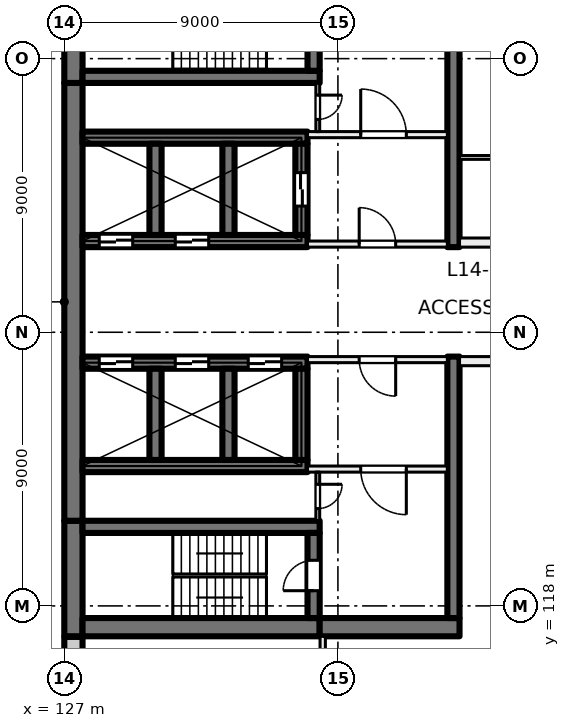
"""IFC4 building model, lengths in metres.
Left out: names, types, materials, properties, quantities, classifications, styles, units other than length and angle.
Written with IfcOpenShell. Run it as: python <this file> out.ifc"""

import sys

from ifc_helpers import new_model, si_unit, direction, frame, frame_2d, origin, place, context, subcontext, project, spatial, rectangle, extrude, element, fill, save


model = new_model("IFC4")
c1 = context("Model", 3, precision=1e-05, world=origin(), true_north=direction((0.0, 1.0)))
c2 = subcontext(c1, "Body", "Model", "MODEL_VIEW")
j1 = project(units=[si_unit("LENGTHUNIT", "METRE"), si_unit("PLANEANGLEUNIT", "RADIAN")], contexts=[c1])
p1 = place(None, origin())
s1 = spatial("IfcSite", under=j1, at=p1, CompositionType="ELEMENT")
p2 = place(p1, origin())
s2 = spatial("IfcBuilding", under=s1, at=p2, CompositionType="ELEMENT")
p3 = place(p2, frame((0.0, 0.0, 63.5)))
s3 = spatial("IfcBuildingStorey", under=s2, at=p3, CompositionType="ELEMENT", Elevation=63.5)
p4 = place(p3, frame((127.3, 117.0, 0.0), z_axis=(0.0, 0.0, 1.0), x_axis=(0.0, 1.0, 0.0)))
e1 = element("IfcWall", 1, at=p4, inside=s3, PredefinedType="SHEAR", context=c2, shape_type="SweptSolid", body=[
    extrude(rectangle(XDim=3.8, YDim=0.6, at=frame_2d((1.9, 0.0))), origin(), (0.0, 0.0, 1.0), 4.0),
])
p5 = place(p3, frame((127.3, 120.8, 0.0), z_axis=(0.0, 0.0, 1.0), x_axis=(0.0, 1.0, 0.0)))
e2 = element("IfcWall", 2, at=p5, inside=s3, PredefinedType="SHEAR", context=c2, shape_type="SweptSolid", body=[
    extrude(rectangle(XDim=14.4, YDim=0.6, at=frame_2d((7.2, 0.0))), origin(), (0.0, 0.0, 1.0), 4.0),
])
p6 = place(p3, frame((127.3, 135.2, 0.0), z_axis=(0.0, 0.0, 1.0), x_axis=(0.0, 1.0, 0.0)))
e3 = element("IfcWall", 3, at=p6, inside=s3, PredefinedType="SHEAR", context=c2, shape_type="SweptSolid", body=[
    extrude(rectangle(XDim=3.8, YDim=0.6, at=frame_2d((1.9, 0.0))), origin(), (0.0, 0.0, 1.0), 4.0),
])
p7 = place(p3, frame((127.6, 117.3, 0.0), z_axis=(0.0, 0.0, 1.0), x_axis=(1.0, 0.0, 0.0)))
e4 = element("IfcWall", 4, at=p7, inside=s3, PredefinedType="SHEAR", context=c2, shape_type="SweptSolid", body=[
    extrude(rectangle(XDim=7.8, YDim=0.6, at=frame_2d((3.9, 0.0))), origin(), (0.0, 0.0, 1.0), 4.0),
])
p8 = place(p3, frame((135.4, 117.3, 0.0), z_axis=(0.0, 0.0, 1.0), x_axis=(1.0, 0.0, 0.0)))
e5 = element("IfcWall", 5, at=p8, inside=s3, PredefinedType="SHEAR", context=c2, shape_type="SweptSolid", body=[
    extrude(rectangle(XDim=4.6, YDim=0.6, at=frame_2d((2.3, 0.0))), origin(), (0.0, 0.0, 1.0), 4.0),
])
p9 = place(p3, frame((127.6, 120.6, 0.0), z_axis=(0.0, 0.0, 1.0), x_axis=(1.0, 0.0, 0.0)))
e6 = element("IfcWall", 6, at=p9, inside=s3, PredefinedType="SHEAR", context=c2, shape_type="SweptSolid", body=[
    extrude(rectangle(XDim=7.8, YDim=0.4, at=frame_2d((3.9, 0.0))), origin(), (0.0, 0.0, 1.0), 4.0),
])
p10 = place(p3, frame((135.2, 117.6, 0.0), z_axis=(0.0, 0.0, 1.0), x_axis=(0.0, 1.0, 0.0)))
e7 = element("IfcWall", 7, at=p10, inside=s3, PredefinedType="SHEAR", context=c2, shape_type="SweptSolid", body=[
    extrude(rectangle(XDim=2.8, YDim=0.4, at=frame_2d((1.4, 0.0))), origin(), (0.0, 0.0, 1.0), 4.0),
])
p11 = place(p10, frame((0.9, 0.0, 0.0)))
e8 = element("IfcOpeningElement", 8, at=p11, cuts=e7, PredefinedType="OPENING", context=c2, shape_type="SweptSolid", body=[
    extrude(rectangle(XDim=1.0, YDim=2.1, at=frame_2d((0.5, 1.05))), frame((0.0, 0.21, 0.0), z_axis=(0.0, -1.0, 0.0), x_axis=(1.0, 0.0, 0.0)), (0.0, 0.0, 1.0), 0.42),
])
p12 = place(p3, frame((127.6, 135.4, 0.0), z_axis=(0.0, 0.0, 1.0), x_axis=(1.0, 0.0, 0.0)))
e9 = element("IfcWall", 9, at=p12, inside=s3, PredefinedType="SHEAR", context=c2, shape_type="SweptSolid", body=[
    extrude(rectangle(XDim=7.8, YDim=0.4, at=frame_2d((3.9, 0.0))), origin(), (0.0, 0.0, 1.0), 4.0),
])
p13 = place(p3, frame((135.2, 135.6, 0.0), z_axis=(0.0, 0.0, 1.0), x_axis=(0.0, 1.0, 0.0)))
e10 = element("IfcWall", 10, at=p13, inside=s3, PredefinedType="SHEAR", context=c2, shape_type="SweptSolid", body=[
    extrude(rectangle(XDim=2.8, YDim=0.4, at=frame_2d((1.4, 0.0))), origin(), (0.0, 0.0, 1.0), 4.0),
])
p14 = place(p13, frame((0.9, 0.0, 0.0)))
e11 = element("IfcOpeningElement", 11, at=p14, cuts=e10, PredefinedType="OPENING", context=c2, shape_type="SweptSolid", body=[
    extrude(rectangle(XDim=1.0, YDim=2.1, at=frame_2d((0.5, 1.05))), frame((0.0, 0.21, 0.0), z_axis=(0.0, -1.0, 0.0), x_axis=(1.0, 0.0, 0.0)), (0.0, 0.0, 1.0), 0.42),
])
p15 = place(p3, frame((127.6, 126.0, 0.0), z_axis=(0.0, 0.0, 1.0), x_axis=(1.0, 0.0, 0.0)))
e12 = element("IfcWall", 12, at=p15, inside=s3, PredefinedType="SHEAR", context=c2, shape_type="SweptSolid", body=[
    extrude(rectangle(XDim=7.4, YDim=0.4, at=frame_2d((3.7, 0.0))), origin(), (0.0, 0.0, 1.0), 4.0),
])
p16 = place(p15, frame((0.55, 0.0, 0.0)))
e13 = element("IfcOpeningElement", 13, at=p16, cuts=e12, PredefinedType="OPENING", context=c2, shape_type="SweptSolid", body=[
    extrude(rectangle(XDim=1.1, YDim=2.1, at=frame_2d((0.55, 1.05))), frame((0.0, 0.21, 0.0), z_axis=(0.0, -1.0, 0.0), x_axis=(1.0, 0.0, 0.0)), (0.0, 0.0, 1.0), 0.42),
])
p17 = place(p15, frame((3.05, 0.0, 0.0)))
e14 = element("IfcOpeningElement", 14, at=p17, cuts=e12, PredefinedType="OPENING", context=c2, shape_type="SweptSolid", body=[
    extrude(rectangle(XDim=1.1, YDim=2.1, at=frame_2d((0.55, 1.05))), frame((0.0, 0.21, 0.0), z_axis=(0.0, -1.0, 0.0), x_axis=(1.0, 0.0, 0.0)), (0.0, 0.0, 1.0), 0.42),
])
p18 = place(p15, frame((5.45, 0.0, 0.0)))
e15 = element("IfcOpeningElement", 15, at=p18, cuts=e12, PredefinedType="OPENING", context=c2, shape_type="SweptSolid", body=[
    extrude(rectangle(XDim=1.1, YDim=2.1, at=frame_2d((0.55, 1.05))), frame((0.0, 0.21, 0.0), z_axis=(0.0, -1.0, 0.0), x_axis=(1.0, 0.0, 0.0)), (0.0, 0.0, 1.0), 0.42),
])
p19 = place(p3, frame((127.6, 122.6, 0.0), z_axis=(0.0, 0.0, 1.0), x_axis=(1.0, 0.0, 0.0)))
e16 = element("IfcWall", 16, at=p19, inside=s3, PredefinedType="SHEAR", context=c2, shape_type="SweptSolid", body=[
    extrude(rectangle(XDim=7.4, YDim=0.4, at=frame_2d((3.7, 0.0))), origin(), (0.0, 0.0, 1.0), 4.0),
])
for number, where, z_axis, x_axis in (
    (17, (130.0, 122.8, 0.0), (0.0, 0.0, 1.0), (0.0, 1.0, 0.0)),
    (18, (132.4, 122.8, 0.0), (0.0, 0.0, 1.0), (0.0, 1.0, 0.0)),
    (19, (134.8, 122.8, 0.0), (0.0, 0.0, 1.0), (0.0, 1.0, 0.0)),
):
    element("IfcWall", number, at=place(p3, frame(where, z_axis=z_axis, x_axis=x_axis)), inside=s3, PredefinedType="SHEAR", context=c2, shape_type="SweptSolid", body=[
        extrude(rectangle(XDim=3.0, YDim=0.4, at=frame_2d((1.5, 0.0))), origin(), (0.0, 0.0, 1.0), 4.0),
    ])
p20 = place(p3, frame((127.6, 130.0, 0.0), z_axis=(0.0, 0.0, 1.0), x_axis=(1.0, 0.0, 0.0)))
e20 = element("IfcWall", 20, at=p20, inside=s3, PredefinedType="SHEAR", context=c2, shape_type="SweptSolid", body=[
    extrude(rectangle(XDim=7.4, YDim=0.4, at=frame_2d((3.7, 0.0))), origin(), (0.0, 0.0, 1.0), 4.0),
])
p21 = place(p20, frame((0.55, 0.0, 0.0)))
e21 = element("IfcOpeningElement", 21, at=p21, cuts=e20, PredefinedType="OPENING", context=c2, shape_type="SweptSolid", body=[
    extrude(rectangle(XDim=1.1, YDim=2.1, at=frame_2d((0.55, 1.05))), frame((0.0, 0.21, 0.0), z_axis=(0.0, -1.0, 0.0), x_axis=(1.0, 0.0, 0.0)), (0.0, 0.0, 1.0), 0.42),
])
p22 = place(p20, frame((3.05, 0.0, 0.0)))
e22 = element("IfcOpeningElement", 22, at=p22, cuts=e20, PredefinedType="OPENING", context=c2, shape_type="SweptSolid", body=[
    extrude(rectangle(XDim=1.1, YDim=2.1, at=frame_2d((0.55, 1.05))), frame((0.0, 0.21, 0.0), z_axis=(0.0, -1.0, 0.0), x_axis=(1.0, 0.0, 0.0)), (0.0, 0.0, 1.0), 0.42),
])
p23 = place(p3, frame((127.6, 133.4, 0.0), z_axis=(0.0, 0.0, 1.0), x_axis=(1.0, 0.0, 0.0)))
e23 = element("IfcWall", 23, at=p23, inside=s3, PredefinedType="SHEAR", context=c2, shape_type="SweptSolid", body=[
    extrude(rectangle(XDim=7.4, YDim=0.4, at=frame_2d((3.7, 0.0))), origin(), (0.0, 0.0, 1.0), 4.0),
])
for number, where, z_axis, x_axis in (
    (24, (130.0, 130.2, 0.0), (0.0, 0.0, 1.0), (0.0, 1.0, 0.0)),
    (25, (132.4, 130.2, 0.0), (0.0, 0.0, 1.0), (0.0, 1.0, 0.0)),
):
    element("IfcWall", number, at=place(p3, frame(where, z_axis=z_axis, x_axis=x_axis)), inside=s3, PredefinedType="SHEAR", context=c2, shape_type="SweptSolid", body=[
        extrude(rectangle(XDim=3.0, YDim=0.4, at=frame_2d((1.5, 0.0))), origin(), (0.0, 0.0, 1.0), 4.0),
    ])
p24 = place(p3, frame((134.8, 130.2, 0.0), z_axis=(0.0, 0.0, 1.0), x_axis=(0.0, 1.0, 0.0)))
e26 = element("IfcWall", 26, at=p24, inside=s3, PredefinedType="SHEAR", context=c2, shape_type="SweptSolid", body=[
    extrude(rectangle(XDim=3.0, YDim=0.4, at=frame_2d((1.5, 0.0))), origin(), (0.0, 0.0, 1.0), 4.0),
])
p25 = place(p24, frame((0.95, 0.0, 0.0)))
e27 = element("IfcOpeningElement", 27, at=p25, cuts=e26, PredefinedType="OPENING", context=c2, shape_type="SweptSolid", body=[
    extrude(rectangle(XDim=1.1, YDim=2.1, at=frame_2d((0.55, 1.05))), frame((0.0, 0.21, 0.0), z_axis=(0.0, -1.0, 0.0), x_axis=(1.0, 0.0, 0.0)), (0.0, 0.0, 1.0), 0.42),
])
for number, where, z_axis, x_axis in (
    (28, (139.8, 117.6, 0.0), (0.0, 0.0, 1.0), (0.0, 1.0, 0.0)),
    (29, (139.8, 129.8, 0.0), (0.0, 0.0, 1.0), (0.0, 1.0, 0.0)),
):
    element("IfcWall", number, at=place(p3, frame(where, z_axis=z_axis, x_axis=x_axis)), inside=s3, PredefinedType="SHEAR", context=c2, shape_type="SweptSolid", body=[
        extrude(rectangle(XDim=8.6, YDim=0.4, at=frame_2d((4.3, 0.0))), origin(), (0.0, 0.0, 1.0), 4.0),
    ])
p26 = place(p3, frame((127.3, 114.07, 0.0), z_axis=(0.0, 0.0, 1.0), x_axis=(0.0, 1.0, 0.0)))
e30 = element("IfcWall", 30, at=p26, inside=s3, PredefinedType="SOLIDWALL", context=c2, shape_type="SweptSolid", body=[
    extrude(rectangle(XDim=2.91, YDim=0.6, at=frame_2d((1.455, 0.0))), origin(), (0.0, 0.0, 1.0), 3.625),
])
p27 = place(p3, frame((135.0, 129.9, 0.0), z_axis=(0.0, 0.0, 1.0), x_axis=(1.0, 0.0, 0.0)))
e31 = element("IfcWall", 31, at=p27, inside=s3, PredefinedType="PARTITIONING", context=c2, shape_type="SweptSolid", body=[
    extrude(rectangle(XDim=4.6, YDim=0.2, at=frame_2d((2.3, 0.0))), origin(), (0.0, 0.0, 1.0), 3.625),
])
p28 = place(p27, frame((1.7, 0.0, 0.0)))
e32 = element("IfcOpeningElement", 32, at=p28, cuts=e31, PredefinedType="OPENING", context=c2, shape_type="SweptSolid", body=[
    extrude(rectangle(XDim=1.2, YDim=2.1, at=frame_2d((0.6, 1.05))), frame((0.0, 0.11, 0.0), z_axis=(0.0, -1.0, 0.0), x_axis=(1.0, 0.0, 0.0)), (0.0, 0.0, 1.0), 0.22),
])
p29 = place(p3, frame((135.0, 133.5, 0.0), z_axis=(0.0, 0.0, 1.0), x_axis=(1.0, 0.0, 0.0)))
e33 = element("IfcWall", 33, at=p29, inside=s3, PredefinedType="PARTITIONING", context=c2, shape_type="SweptSolid", body=[
    extrude(rectangle(XDim=4.6, YDim=0.2, at=frame_2d((2.3, 0.0))), origin(), (0.0, 0.0, 1.0), 3.625),
])
p30 = place(p29, frame((1.75, 0.0, 0.0)))
e34 = element("IfcOpeningElement", 34, at=p30, cuts=e33, PredefinedType="OPENING", context=c2, shape_type="SweptSolid", body=[
    extrude(rectangle(XDim=1.5, YDim=2.1, at=frame_2d((0.75, 1.05))), frame((0.0, 0.11, 0.0), z_axis=(0.0, -1.0, 0.0), x_axis=(1.0, 0.0, 0.0)), (0.0, 0.0, 1.0), 0.22),
])
p31 = place(p3, frame((135.337, 135.2, 0.0), z_axis=(0.0, 0.0, 1.0), x_axis=(0.0, -1.0, 0.0)))
e35 = element("IfcWall", 35, at=p31, inside=s3, PredefinedType="PARTITIONING", context=c2, shape_type="SweptSolid", body=[
    extrude(rectangle(XDim=1.6, YDim=0.125, at=frame_2d((0.8, 0.0))), origin(), (0.0, 0.0, 1.0), 3.625),
])
p32 = place(p31, frame((0.4, 0.0, 0.0)))
e36 = element("IfcOpeningElement", 36, at=p32, cuts=e35, PredefinedType="OPENING", context=c2, shape_type="SweptSolid", body=[
    extrude(rectangle(XDim=0.8, YDim=2.1, at=frame_2d((0.4, 1.05))), frame((0.0, 0.073, 0.0), z_axis=(0.0, -1.0, 0.0), x_axis=(1.0, 0.0, 0.0)), (0.0, 0.0, 1.0), 0.145),
])
p33 = place(p3, frame((139.6, 126.1, 0.0), z_axis=(0.0, 0.0, 1.0), x_axis=(-1.0, 0.0, 0.0)))
e37 = element("IfcWall", 37, at=p33, inside=s3, PredefinedType="PARTITIONING", context=c2, shape_type="SweptSolid", body=[
    extrude(rectangle(XDim=4.6, YDim=0.2, at=frame_2d((2.3, 0.0))), origin(), (0.0, 0.0, 1.0), 3.625),
])
p34 = place(p33, frame((1.7, 0.0, 0.0)))
e38 = element("IfcOpeningElement", 38, at=p34, cuts=e37, PredefinedType="OPENING", context=c2, shape_type="SweptSolid", body=[
    extrude(rectangle(XDim=1.2, YDim=2.1, at=frame_2d((0.6, 1.05))), frame((0.0, 0.11, 0.0), z_axis=(0.0, -1.0, 0.0), x_axis=(1.0, 0.0, 0.0)), (0.0, 0.0, 1.0), 0.22),
])
p35 = place(p3, frame((139.6, 122.5, 0.0), z_axis=(0.0, 0.0, 1.0), x_axis=(-1.0, 0.0, 0.0)))
e39 = element("IfcWall", 39, at=p35, inside=s3, PredefinedType="PARTITIONING", context=c2, shape_type="SweptSolid", body=[
    extrude(rectangle(XDim=4.6, YDim=0.2, at=frame_2d((2.3, 0.0))), origin(), (0.0, 0.0, 1.0), 3.625),
])
p36 = place(p35, frame((1.35, 0.0, 0.0)))
e40 = element("IfcOpeningElement", 40, at=p36, cuts=e39, PredefinedType="OPENING", context=c2, shape_type="SweptSolid", body=[
    extrude(rectangle(XDim=1.5, YDim=2.1, at=frame_2d((0.75, 1.05))), frame((0.0, 0.11, 0.0), z_axis=(0.0, -1.0, 0.0), x_axis=(1.0, 0.0, 0.0)), (0.0, 0.0, 1.0), 0.22),
])
p37 = place(p3, frame((135.337, 122.4, 0.0), z_axis=(0.0, 0.0, 1.0), x_axis=(0.0, -1.0, 0.0)))
e41 = element("IfcWall", 41, at=p37, inside=s3, PredefinedType="PARTITIONING", context=c2, shape_type="SweptSolid", body=[
    extrude(rectangle(XDim=1.6, YDim=0.125, at=frame_2d((0.8, 0.0))), origin(), (0.0, 0.0, 1.0), 3.625),
])
p38 = place(p37, frame((0.4, 0.0, 0.0)))
e42 = element("IfcOpeningElement", 42, at=p38, cuts=e41, PredefinedType="OPENING", context=c2, shape_type="SweptSolid", body=[
    extrude(rectangle(XDim=0.8, YDim=2.1, at=frame_2d((0.4, 1.05))), frame((0.0, 0.073, 0.0), z_axis=(0.0, -1.0, 0.0), x_axis=(1.0, 0.0, 0.0)), (0.0, 0.0, 1.0), 0.145),
])
p39 = place(p3, frame((135.5, 117.0, 0.0), z_axis=(0.0, 0.0, 1.0), x_axis=(0.0, -1.0, 0.0)))
e43 = element("IfcWall", 43, at=p39, inside=s3, PredefinedType="PARTITIONING", context=c2, shape_type="SweptSolid", body=[
    extrude(rectangle(XDim=6.4, YDim=0.175, at=frame_2d((3.2, 0.0))), origin(), (0.0, 0.0, 1.0), 3.625),
])
p40 = place(p39, frame((2.6, 0.0, 0.0)))
e44 = element("IfcOpeningElement", 44, at=p40, cuts=e43, PredefinedType="OPENING", context=c2, shape_type="SweptSolid", body=[
    extrude(rectangle(XDim=1.2, YDim=2.1, at=frame_2d((0.6, 1.05))), frame((0.0, 0.097, 0.0), z_axis=(0.0, -1.0, 0.0), x_axis=(1.0, 0.0, 0.0)), (0.0, 0.0, 1.0), 0.195),
])
p41 = place(p3, frame((140.0, 129.95, 0.0), z_axis=(0.0, 0.0, 1.0), x_axis=(1.0, 0.0, 0.0)))
e45 = element("IfcWall", 45, at=p41, inside=s3, PredefinedType="PARTITIONING", context=c2, shape_type="SweptSolid", body=[
    extrude(rectangle(XDim=14.0, YDim=0.3, at=frame_2d((7.0, 0.0))), origin(), (0.0, 0.0, 1.0), 3.625),
])
p42 = place(p41, frame((5.25, 0.0, 0.0)))
e46 = element("IfcOpeningElement", 46, at=p42, cuts=e45, PredefinedType="OPENING", context=c2, shape_type="SweptSolid", body=[
    extrude(rectangle(XDim=1.0, YDim=2.1, at=frame_2d((0.5, 1.05))), frame((0.0, 0.16, 0.0), z_axis=(0.0, -1.0, 0.0), x_axis=(1.0, 0.0, 0.0)), (0.0, 0.0, 1.0), 0.32),
])
p43 = place(p41, frame((10.6, 0.0, 0.0)))
e47 = element("IfcOpeningElement", 47, at=p43, cuts=e45, PredefinedType="OPENING", context=c2, shape_type="SweptSolid", body=[
    extrude(rectangle(XDim=1.8, YDim=2.1, at=frame_2d((0.9, 1.05))), frame((0.0, 0.16, 0.0), z_axis=(0.0, -1.0, 0.0), x_axis=(1.0, 0.0, 0.0)), (0.0, 0.0, 1.0), 0.32),
])
p44 = place(p3, frame((140.0, 132.75, 0.0), z_axis=(0.0, 0.0, 1.0), x_axis=(1.0, 0.0, 0.0)))
e48 = element("IfcWall", 48, at=p44, inside=s3, PredefinedType="PARTITIONING", context=c2, shape_type="SweptSolid", body=[
    extrude(rectangle(XDim=8.938, YDim=0.125, at=frame_2d((4.469, 0.0))), origin(), (0.0, 0.0, 1.0), 3.625),
])
p45 = place(p44, frame((6.329, 0.0, 0.0)))
e49 = element("IfcOpeningElement", 49, at=p45, cuts=e48, PredefinedType="OPENING", context=c2, shape_type="SweptSolid", body=[
    extrude(rectangle(XDim=0.8, YDim=2.1, at=frame_2d((0.4, 1.05))), frame((0.0, 0.073, 0.0), z_axis=(0.0, -1.0, 0.0), x_axis=(1.0, 0.0, 0.0)), (0.0, 0.0, 1.0), 0.145),
])
p46 = place(p44, frame((3.1, 0.0, 0.0)))
e50 = element("IfcOpeningElement", 50, at=p46, cuts=e48, PredefinedType="OPENING", context=c2, shape_type="SweptSolid", body=[
    extrude(rectangle(XDim=0.8, YDim=2.1, at=frame_2d((0.4, 1.05))), frame((0.0, 0.073, 0.0), z_axis=(0.0, -1.0, 0.0), x_axis=(1.0, 0.0, 0.0)), (0.0, 0.0, 1.0), 0.145),
])
p47 = place(p3, frame((154.0, 126.05, 0.0), z_axis=(0.0, 0.0, 1.0), x_axis=(-1.0, 0.0, 0.0)))
e51 = element("IfcWall", 51, at=p47, inside=s3, PredefinedType="PARTITIONING", context=c2, shape_type="SweptSolid", body=[
    extrude(rectangle(XDim=14.0, YDim=0.3, at=frame_2d((7.0, 0.0))), origin(), (0.0, 0.0, 1.0), 3.625),
])
p48 = place(p47, frame((6.1, 0.0, 0.0)))
e52 = element("IfcOpeningElement", 52, at=p48, cuts=e51, PredefinedType="OPENING", context=c2, shape_type="SweptSolid", body=[
    extrude(rectangle(XDim=1.8, YDim=2.1, at=frame_2d((0.9, 1.05))), frame((0.0, 0.16, 0.0), z_axis=(0.0, -1.0, 0.0), x_axis=(1.0, 0.0, 0.0)), (0.0, 0.0, 1.0), 0.32),
])
p49 = place(p21, origin())
e53 = element("IfcDoor", 53, at=p49, inside=s3, OperationType="DOUBLE_DOOR_SLIDING", PredefinedType="DOOR", context=c2, shape_type="SweptSolid", body=[
    extrude(rectangle(XDim=1.1, YDim=2.1, at=frame_2d((0.55, 1.05))), frame((0.0, 0.025, 0.0), z_axis=(0.0, -1.0, 0.0), x_axis=(1.0, 0.0, 0.0)), (0.0, 0.0, 1.0), 0.05),
])
fill(e21, e53)
p50 = place(p22, origin())
e54 = element("IfcDoor", 54, at=p50, inside=s3, OperationType="DOUBLE_DOOR_SLIDING", PredefinedType="DOOR", context=c2, shape_type="SweptSolid", body=[
    extrude(rectangle(XDim=1.1, YDim=2.1, at=frame_2d((0.55, 1.05))), frame((0.0, 0.025, 0.0), z_axis=(0.0, -1.0, 0.0), x_axis=(1.0, 0.0, 0.0)), (0.0, 0.0, 1.0), 0.05),
])
fill(e22, e54)
p51 = place(p16, origin())
e55 = element("IfcDoor", 55, at=p51, inside=s3, OperationType="DOUBLE_DOOR_SLIDING", PredefinedType="DOOR", context=c2, shape_type="SweptSolid", body=[
    extrude(rectangle(XDim=1.1, YDim=2.1, at=frame_2d((0.55, 1.05))), frame((0.0, 0.025, 0.0), z_axis=(0.0, -1.0, 0.0), x_axis=(1.0, 0.0, 0.0)), (0.0, 0.0, 1.0), 0.05),
])
fill(e13, e55)
p52 = place(p17, origin())
e56 = element("IfcDoor", 56, at=p52, inside=s3, OperationType="DOUBLE_DOOR_SLIDING", PredefinedType="DOOR", context=c2, shape_type="SweptSolid", body=[
    extrude(rectangle(XDim=1.1, YDim=2.1, at=frame_2d((0.55, 1.05))), frame((0.0, 0.025, 0.0), z_axis=(0.0, -1.0, 0.0), x_axis=(1.0, 0.0, 0.0)), (0.0, 0.0, 1.0), 0.05),
])
fill(e14, e56)
p53 = place(p18, origin())
e57 = element("IfcDoor", 57, at=p53, inside=s3, OperationType="DOUBLE_DOOR_SLIDING", PredefinedType="DOOR", context=c2, shape_type="SweptSolid", body=[
    extrude(rectangle(XDim=1.1, YDim=2.1, at=frame_2d((0.55, 1.05))), frame((0.0, 0.025, 0.0), z_axis=(0.0, -1.0, 0.0), x_axis=(1.0, 0.0, 0.0)), (0.0, 0.0, 1.0), 0.05),
])
fill(e15, e57)
p54 = place(p28, origin())
e58 = element("IfcDoor", 58, at=p54, inside=s3, OperationType="DOUBLE_DOOR_SINGLE_SWING", PredefinedType="DOOR", context=c2, shape_type="SweptSolid", body=[
    extrude(rectangle(XDim=1.2, YDim=2.1, at=frame_2d((0.6, 1.05))), frame((0.0, 0.025, 0.0), z_axis=(0.0, -1.0, 0.0), x_axis=(1.0, 0.0, 0.0)), (0.0, 0.0, 1.0), 0.05),
])
fill(e32, e58)
p55 = place(p30, origin())
e59 = element("IfcDoor", 59, at=p55, inside=s3, OperationType="DOUBLE_DOOR_SINGLE_SWING", PredefinedType="DOOR", context=c2, shape_type="SweptSolid", body=[
    extrude(rectangle(XDim=1.5, YDim=2.1, at=frame_2d((0.75, 1.05))), frame((0.0, 0.025, 0.0), z_axis=(0.0, -1.0, 0.0), x_axis=(1.0, 0.0, 0.0)), (0.0, 0.0, 1.0), 0.05),
])
fill(e34, e59)
p56 = place(p32, origin())
e60 = element("IfcDoor", 60, at=p56, inside=s3, OperationType="SINGLE_SWING_RIGHT", PredefinedType="DOOR", context=c2, shape_type="SweptSolid", body=[
    extrude(rectangle(XDim=0.8, YDim=2.1, at=frame_2d((0.4, 1.05))), frame((0.0, 0.025, 0.0), z_axis=(0.0, -1.0, 0.0), x_axis=(1.0, 0.0, 0.0)), (0.0, 0.0, 1.0), 0.05),
])
fill(e36, e60)
p57 = place(p34, origin())
e61 = element("IfcDoor", 61, at=p57, inside=s3, OperationType="DOUBLE_DOOR_SINGLE_SWING", PredefinedType="DOOR", context=c2, shape_type="SweptSolid", body=[
    extrude(rectangle(XDim=1.2, YDim=2.1, at=frame_2d((0.6, 1.05))), frame((0.0, 0.025, 0.0), z_axis=(0.0, -1.0, 0.0), x_axis=(1.0, 0.0, 0.0)), (0.0, 0.0, 1.0), 0.05),
])
fill(e38, e61)
p58 = place(p36, origin())
e62 = element("IfcDoor", 62, at=p58, inside=s3, OperationType="DOUBLE_DOOR_SINGLE_SWING", PredefinedType="DOOR", context=c2, shape_type="SweptSolid", body=[
    extrude(rectangle(XDim=1.5, YDim=2.1, at=frame_2d((0.75, 1.05))), frame((0.0, 0.025, 0.0), z_axis=(0.0, -1.0, 0.0), x_axis=(1.0, 0.0, 0.0)), (0.0, 0.0, 1.0), 0.05),
])
fill(e40, e62)
p59 = place(p11, origin())
e63 = element("IfcDoor", 63, at=p59, inside=s3, OperationType="SINGLE_SWING_RIGHT", PredefinedType="DOOR", context=c2, shape_type="SweptSolid", body=[
    extrude(rectangle(XDim=1.0, YDim=2.1, at=frame_2d((0.5, 1.05))), frame((0.0, 0.025, 0.0), z_axis=(0.0, -1.0, 0.0), x_axis=(1.0, 0.0, 0.0)), (0.0, 0.0, 1.0), 0.05),
])
fill(e8, e63)
p60 = place(p38, origin())
e64 = element("IfcDoor", 64, at=p60, inside=s3, OperationType="SINGLE_SWING_LEFT", PredefinedType="DOOR", context=c2, shape_type="SweptSolid", body=[
    extrude(rectangle(XDim=0.8, YDim=2.1, at=frame_2d((0.4, 1.05))), frame((0.0, 0.025, 0.0), z_axis=(0.0, -1.0, 0.0), x_axis=(1.0, 0.0, 0.0)), (0.0, 0.0, 1.0), 0.05),
])
fill(e42, e64)
p61 = place(p25, origin())
e65 = element("IfcDoor", 65, at=p61, inside=s3, OperationType="DOUBLE_DOOR_SLIDING", PredefinedType="DOOR", context=c2, shape_type="SweptSolid", body=[
    extrude(rectangle(XDim=1.1, YDim=2.1, at=frame_2d((0.55, 1.05))), frame((0.0, 0.025, 0.0), z_axis=(0.0, -1.0, 0.0), x_axis=(1.0, 0.0, 0.0)), (0.0, 0.0, 1.0), 0.05),
])
fill(e27, e65)
save(model, sys.argv[1])
